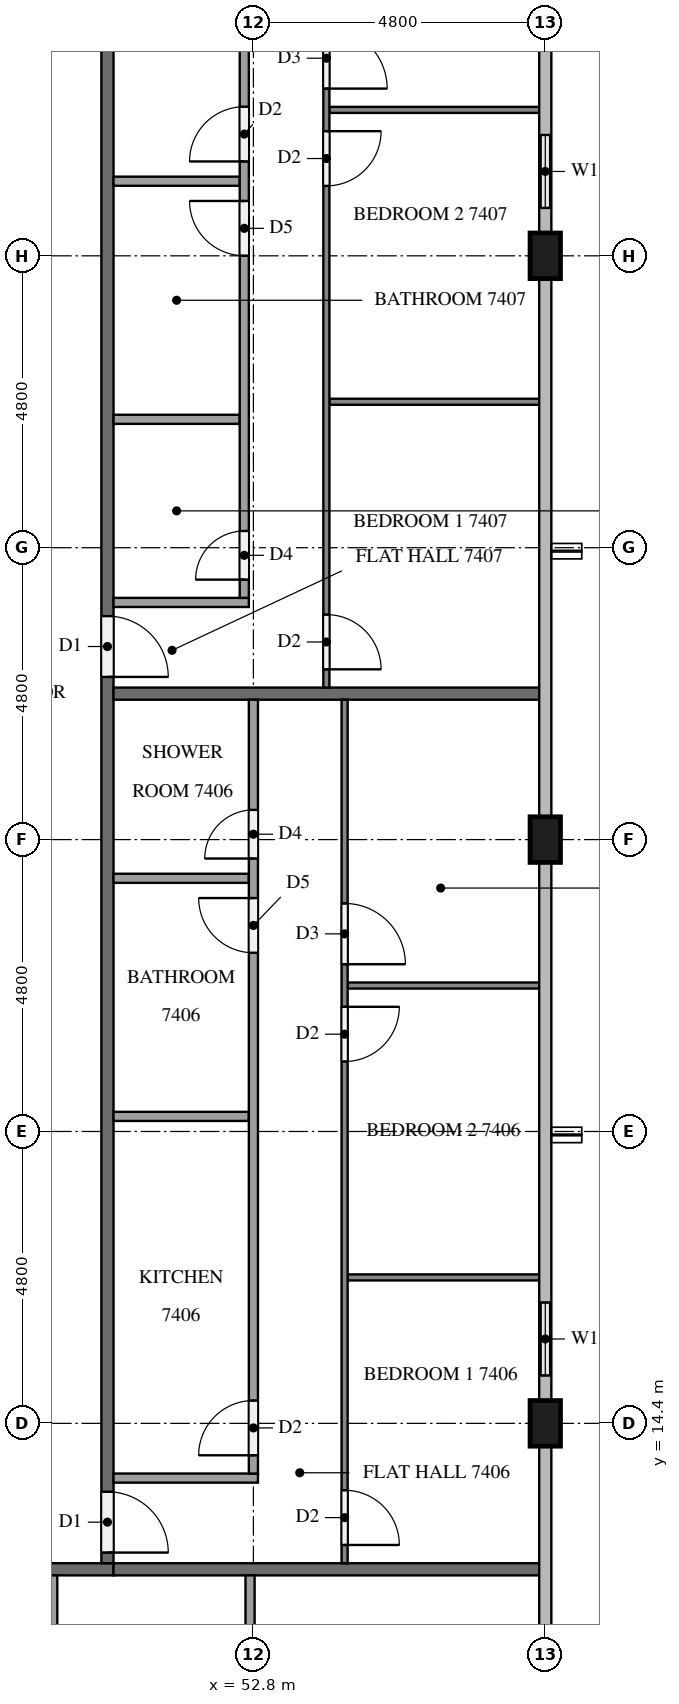
"""IFC4 building model, lengths in metres.
Left out: names, types, materials, properties, quantities, classifications, styles, units other than length and angle.
Written with IfcOpenShell. Run it as: python <this file> out.ifc"""

import sys

from ifc_helpers import new_model, si_unit, direction, frame, frame_2d, origin, origin_2d, place, context, subcontext, project, spatial, rectangle, extrude, element, fill, save


model = new_model("IFC4")
c1 = context("Model", 3, precision=1e-05, world=origin(), true_north=direction((0.0, 1.0)))
c2 = subcontext(c1, "Body", "Model", "MODEL_VIEW")
j1 = project(units=[si_unit("LENGTHUNIT", "METRE"), si_unit("PLANEANGLEUNIT", "RADIAN")], contexts=[c1])
p1 = place(None, origin())
s1 = spatial("IfcSite", under=j1, at=p1, CompositionType="ELEMENT")
p2 = place(p1, origin())
s2 = spatial("IfcBuilding", under=s1, at=p2, CompositionType="ELEMENT")
p3 = place(p2, frame((0.0, 0.0, 282.6)))
s3 = spatial("IfcBuildingStorey", under=s2, at=p3, CompositionType="ELEMENT", Elevation=282.6)
for number, where, z_axis, x_axis in (
    (1, (57.6, 14.4, 0.0), (0.0, 0.0, 1.0), (0.0, 1.0, 0.0)),
    (2, (57.6, 24.0, 0.0), (0.0, 0.0, 1.0), (0.0, 1.0, 0.0)),
    (3, (57.6, 33.6, 0.0), (0.0, 0.0, 1.0), (0.0, 1.0, 0.0)),
):
    element("IfcColumn", number, at=place(p3, frame(where, z_axis=z_axis, x_axis=x_axis)), inside=s3, PredefinedType="COLUMN", context=c2, shape_type="SweptSolid", body=[
        extrude(rectangle(XDim=0.75, YDim=0.5, at=origin_2d()), origin(), (0.0, 0.0, 1.0), 3.2),
    ])
p4 = place(p3, frame((57.6, 14.775, 0.0), z_axis=(0.0, 0.0, 1.0), x_axis=(0.0, 1.0, 0.0)))
e4 = element("IfcWall", 4, at=p4, inside=s3, PredefinedType="SOLIDWALL", context=c2, shape_type="SweptSolid", body=[
    extrude(rectangle(XDim=2.025, YDim=0.15, at=frame_2d((1.013, 0.0))), origin(), (0.0, 0.0, 1.0), 3.2),
])
p5 = place(p4, frame((0.413, 0.0, 0.9)))
e5 = element("IfcOpeningElement", 5, at=p5, cuts=e4, PredefinedType="OPENING", context=c2, shape_type="SweptSolid", body=[
    extrude(rectangle(XDim=1.2, YDim=1.4, at=frame_2d((0.6, 0.7))), frame((0.0, 0.085, 0.0), z_axis=(0.0, -1.0, 0.0), x_axis=(1.0, 0.0, 0.0)), (0.0, 0.0, 1.0), 0.17),
])
p6 = place(p3, frame((57.6, 33.975, 0.0), z_axis=(0.0, 0.0, 1.0), x_axis=(0.0, 1.0, 0.0)))
e6 = element("IfcWall", 6, at=p6, inside=s3, PredefinedType="SOLIDWALL", context=c2, shape_type="SweptSolid", body=[
    extrude(rectangle(XDim=2.025, YDim=0.15, at=frame_2d((1.012, 0.0))), origin(), (0.0, 0.0, 1.0), 3.2),
])
p7 = place(p6, frame((0.413, 0.0, 0.9)))
e7 = element("IfcOpeningElement", 7, at=p7, cuts=e6, PredefinedType="OPENING", context=c2, shape_type="SweptSolid", body=[
    extrude(rectangle(XDim=1.2, YDim=1.4, at=frame_2d((0.6, 0.7))), frame((0.0, 0.085, 0.0), z_axis=(0.0, -1.0, 0.0), x_axis=(1.0, 0.0, 0.0)), (0.0, 0.0, 1.0), 0.17),
])
p8 = place(p3, frame((50.5, 12.0, 0.0), z_axis=(0.0, 0.0, 1.0), x_axis=(-1.0, 0.0, 0.0)))
e8 = element("IfcWall", 8, at=p8, inside=s3, PredefinedType="PARTITIONING", context=c2, shape_type="SweptSolid", body=[
    extrude(rectangle(XDim=38.6, YDim=0.2, at=frame_2d((19.3, 0.0))), origin(), (0.0, 0.0, 1.0), 3.2),
])
p9 = place(p8, frame((36.375, 0.0, 0.0)))
e9 = element("IfcOpeningElement", 9, at=p9, cuts=e8, PredefinedType="OPENING", context=c2, shape_type="SweptSolid", body=[
    extrude(rectangle(XDim=1.0, YDim=2.1, at=frame_2d((0.5, 1.05))), frame((0.0, 0.11, 0.0), z_axis=(0.0, -1.0, 0.0), x_axis=(1.0, 0.0, 0.0)), (0.0, 0.0, 1.0), 0.22),
])
p10 = place(p8, frame((29.175, 0.0, 0.0)))
e10 = element("IfcOpeningElement", 10, at=p10, cuts=e8, PredefinedType="OPENING", context=c2, shape_type="SweptSolid", body=[
    extrude(rectangle(XDim=1.0, YDim=2.1, at=frame_2d((0.5, 1.05))), frame((0.0, 0.11, 0.0), z_axis=(0.0, -1.0, 0.0), x_axis=(1.0, 0.0, 0.0)), (0.0, 0.0, 1.0), 0.22),
])
p11 = place(p8, frame((27.625, 0.0, 0.0)))
e11 = element("IfcOpeningElement", 11, at=p11, cuts=e8, PredefinedType="OPENING", context=c2, shape_type="SweptSolid", body=[
    extrude(rectangle(XDim=1.0, YDim=2.1, at=frame_2d((0.5, 1.05))), frame((0.0, 0.11, 0.0), z_axis=(0.0, -1.0, 0.0), x_axis=(1.0, 0.0, 0.0)), (0.0, 0.0, 1.0), 0.22),
])
p12 = place(p8, frame((2.775, 0.0, 0.0)))
e12 = element("IfcOpeningElement", 12, at=p12, cuts=e8, PredefinedType="OPENING", context=c2, shape_type="SweptSolid", body=[
    extrude(rectangle(XDim=1.0, YDim=2.1, at=frame_2d((0.5, 1.05))), frame((0.0, 0.11, 0.0), z_axis=(0.0, -1.0, 0.0), x_axis=(1.0, 0.0, 0.0)), (0.0, 0.0, 1.0), 0.22),
])
p13 = place(p8, frame((1.225, 0.0, 0.0)))
e13 = element("IfcOpeningElement", 13, at=p13, cuts=e8, PredefinedType="OPENING", context=c2, shape_type="SweptSolid", body=[
    extrude(rectangle(XDim=1.0, YDim=2.1, at=frame_2d((0.5, 1.05))), frame((0.0, 0.11, 0.0), z_axis=(0.0, -1.0, 0.0), x_axis=(1.0, 0.0, 0.0)), (0.0, 0.0, 1.0), 0.22),
])
p14 = place(p3, frame((50.4, 40.7, 0.0), z_axis=(0.0, 0.0, 1.0), x_axis=(0.0, -1.0, 0.0)))
e14 = element("IfcWall", 14, at=p14, inside=s3, PredefinedType="PARTITIONING", context=c2, shape_type="SweptSolid", body=[
    extrude(rectangle(XDim=28.6, YDim=0.2, at=frame_2d((14.3, 0.0))), origin(), (0.0, 0.0, 1.0), 3.2),
])
p15 = place(p14, frame((27.425, 0.0, 0.0)))
e15 = element("IfcOpeningElement", 15, at=p15, cuts=e14, PredefinedType="OPENING", context=c2, shape_type="SweptSolid", body=[
    extrude(rectangle(XDim=1.0, YDim=2.1, at=frame_2d((0.5, 1.05))), frame((0.0, 0.11, 0.0), z_axis=(0.0, -1.0, 0.0), x_axis=(1.0, 0.0, 0.0)), (0.0, 0.0, 1.0), 0.22),
])
p16 = place(p14, frame((13.025, 0.0, 0.0)))
e16 = element("IfcOpeningElement", 16, at=p16, cuts=e14, PredefinedType="OPENING", context=c2, shape_type="SweptSolid", body=[
    extrude(rectangle(XDim=1.0, YDim=2.1, at=frame_2d((0.5, 1.05))), frame((0.0, 0.11, 0.0), z_axis=(0.0, -1.0, 0.0), x_axis=(1.0, 0.0, 0.0)), (0.0, 0.0, 1.0), 0.22),
])
for number, where, z_axis, x_axis in (
    (17, (50.5, 12.0, 0.0), (0.0, 0.0, 1.0), (1.0, 0.0, 0.0)),
    (18, (50.5, 26.4, 0.0), (0.0, 0.0, 1.0), (1.0, 0.0, 0.0)),
):
    element("IfcWall", number, at=place(p3, frame(where, z_axis=z_axis, x_axis=x_axis)), inside=s3, PredefinedType="PARTITIONING", context=c2, shape_type="SweptSolid", body=[
        extrude(rectangle(XDim=7.0, YDim=0.2, at=frame_2d((3.5, 0.0))), origin(), (0.0, 0.0, 1.0), 3.2),
    ])
p17 = place(p3, frame((52.745, 11.9, 0.0), z_axis=(0.0, 0.0, 1.0), x_axis=(0.0, -1.0, 0.0)))
e19 = element("IfcWall", 19, at=p17, inside=s3, PredefinedType="PARTITIONING", context=c2, shape_type="SweptSolid", body=[
    extrude(rectangle(XDim=3.575, YDim=0.15, at=frame_2d((1.788, 0.0))), origin(), (0.0, 0.0, 1.0), 3.2),
])
p18 = place(p3, frame((49.5, 11.9, 0.0), z_axis=(0.0, 0.0, 1.0), x_axis=(0.0, -1.0, 0.0)))
e20 = element("IfcWall", 20, at=p18, inside=s3, PredefinedType="PARTITIONING", context=c2, shape_type="SweptSolid", body=[
    extrude(rectangle(XDim=3.725, YDim=0.15, at=frame_2d((1.862, 0.0))), origin(), (0.0, 0.0, 1.0), 3.2),
])
for number, where, z_axis, x_axis in (
    (21, (54.35, 16.8, 0.0), (0.0, 0.0, 1.0), (1.0, 0.0, 0.0)),
    (22, (54.35, 21.6, 0.0), (0.0, 0.0, 1.0), (1.0, 0.0, 0.0)),
):
    element("IfcWall", number, at=place(p3, frame(where, z_axis=z_axis, x_axis=x_axis)), inside=s3, PredefinedType="PARTITIONING", context=c2, shape_type="SweptSolid", body=[
        extrude(rectangle(XDim=3.15, YDim=0.1, at=frame_2d((1.575, 0.0))), origin(), (0.0, 0.0, 1.0), 3.2),
    ])
p19 = place(p3, frame((54.3, 26.3, 0.0), z_axis=(0.0, 0.0, 1.0), x_axis=(0.0, -1.0, 0.0)))
e23 = element("IfcWall", 23, at=p19, inside=s3, PredefinedType="PARTITIONING", context=c2, shape_type="SweptSolid", body=[
    extrude(rectangle(XDim=14.2, YDim=0.1, at=frame_2d((7.1, 0.0))), origin(), (0.0, 0.0, 1.0), 3.2),
])
p20 = place(p19, frame((13.0, 0.0, 0.0)))
e24 = element("IfcOpeningElement", 24, at=p20, cuts=e23, PredefinedType="OPENING", context=c2, shape_type="SweptSolid", body=[
    extrude(rectangle(XDim=0.9, YDim=2.1, at=frame_2d((0.45, 1.05))), frame((0.0, 0.06, 0.0), z_axis=(0.0, -1.0, 0.0), x_axis=(1.0, 0.0, 0.0)), (0.0, 0.0, 1.0), 0.12),
])
p21 = place(p19, frame((5.05, 0.0, 0.0)))
e25 = element("IfcOpeningElement", 25, at=p21, cuts=e23, PredefinedType="OPENING", context=c2, shape_type="SweptSolid", body=[
    extrude(rectangle(XDim=0.9, YDim=2.1, at=frame_2d((0.45, 1.05))), frame((0.0, 0.06, 0.0), z_axis=(0.0, -1.0, 0.0), x_axis=(1.0, 0.0, 0.0)), (0.0, 0.0, 1.0), 0.12),
])
p22 = place(p19, frame((3.35, 0.0, 0.0)))
e26 = element("IfcOpeningElement", 26, at=p22, cuts=e23, PredefinedType="OPENING", context=c2, shape_type="SweptSolid", body=[
    extrude(rectangle(XDim=1.0, YDim=2.1, at=frame_2d((0.5, 1.05))), frame((0.0, 0.06, 0.0), z_axis=(0.0, -1.0, 0.0), x_axis=(1.0, 0.0, 0.0)), (0.0, 0.0, 1.0), 0.12),
])
for number, where, z_axis, x_axis in (
    (27, (50.5, 19.448, 0.0), (0.0, 0.0, 1.0), (1.0, 0.0, 0.0)),
    (28, (50.5, 23.364, 0.0), (0.0, 0.0, 1.0), (1.0, 0.0, 0.0)),
):
    element("IfcWall", number, at=place(p3, frame(where, z_axis=z_axis, x_axis=x_axis)), inside=s3, PredefinedType="PARTITIONING", context=c2, shape_type="SweptSolid", body=[
        extrude(rectangle(XDim=2.225, YDim=0.15, at=frame_2d((1.113, 0.0))), origin(), (0.0, 0.0, 1.0), 3.2),
    ])
p23 = place(p3, frame((50.5, 13.5, 0.0), z_axis=(0.0, 0.0, 1.0), x_axis=(1.0, 0.0, 0.0)))
e29 = element("IfcWall", 29, at=p23, inside=s3, PredefinedType="PARTITIONING", context=c2, shape_type="SweptSolid", body=[
    extrude(rectangle(XDim=2.375, YDim=0.15, at=frame_2d((1.188, 0.0))), origin(), (0.0, 0.0, 1.0), 3.2),
])
p24 = place(p3, frame((52.8, 13.575, 0.0), z_axis=(0.0, 0.0, 1.0), x_axis=(0.0, 1.0, 0.0)))
e30 = element("IfcWall", 30, at=p24, inside=s3, PredefinedType="PARTITIONING", context=c2, shape_type="SweptSolid", body=[
    extrude(rectangle(XDim=12.725, YDim=0.15, at=frame_2d((6.363, 0.0))), origin(), (0.0, 0.0, 1.0), 3.2),
])
p25 = place(p24, frame((0.3, 0.0, 0.0)))
e31 = element("IfcOpeningElement", 31, at=p25, cuts=e30, PredefinedType="OPENING", context=c2, shape_type="SweptSolid", body=[
    extrude(rectangle(XDim=0.9, YDim=2.1, at=frame_2d((0.45, 1.05))), frame((0.0, 0.085, 0.0), z_axis=(0.0, -1.0, 0.0), x_axis=(1.0, 0.0, 0.0)), (0.0, 0.0, 1.0), 0.17),
])
p26 = place(p24, frame((8.563, 0.0, 0.0)))
e32 = element("IfcOpeningElement", 32, at=p26, cuts=e30, PredefinedType="OPENING", context=c2, shape_type="SweptSolid", body=[
    extrude(rectangle(XDim=0.9, YDim=2.1, at=frame_2d((0.45, 1.05))), frame((0.0, 0.085, 0.0), z_axis=(0.0, -1.0, 0.0), x_axis=(1.0, 0.0, 0.0)), (0.0, 0.0, 1.0), 0.17),
])
p27 = place(p24, frame((10.114, 0.0, 0.0)))
e33 = element("IfcOpeningElement", 33, at=p27, cuts=e30, PredefinedType="OPENING", context=c2, shape_type="SweptSolid", body=[
    extrude(rectangle(XDim=0.8, YDim=2.1, at=frame_2d((0.4, 1.05))), frame((0.0, 0.085, 0.0), z_axis=(0.0, -1.0, 0.0), x_axis=(1.0, 0.0, 0.0)), (0.0, 0.0, 1.0), 0.17),
])
for number, where, z_axis, x_axis in (
    (34, (54.05, 31.2, 0.0), (0.0, 0.0, 1.0), (1.0, 0.0, 0.0)),
    (35, (54.05, 36.0, 0.0), (0.0, 0.0, 1.0), (1.0, 0.0, 0.0)),
):
    element("IfcWall", number, at=place(p3, frame(where, z_axis=z_axis, x_axis=x_axis)), inside=s3, PredefinedType="PARTITIONING", context=c2, shape_type="SweptSolid", body=[
        extrude(rectangle(XDim=3.45, YDim=0.1, at=frame_2d((1.725, 0.0))), origin(), (0.0, 0.0, 1.0), 3.2),
    ])
p28 = place(p3, frame((54.0, 40.7, 0.0), z_axis=(0.0, 0.0, 1.0), x_axis=(0.0, -1.0, 0.0)))
e36 = element("IfcWall", 36, at=p28, inside=s3, PredefinedType="PARTITIONING", context=c2, shape_type="SweptSolid", body=[
    extrude(rectangle(XDim=14.2, YDim=0.1, at=frame_2d((7.1, 0.0))), origin(), (0.0, 0.0, 1.0), 3.2),
])
p29 = place(p28, frame((13.0, 0.0, 0.0)))
e37 = element("IfcOpeningElement", 37, at=p29, cuts=e36, PredefinedType="OPENING", context=c2, shape_type="SweptSolid", body=[
    extrude(rectangle(XDim=0.9, YDim=2.1, at=frame_2d((0.45, 1.05))), frame((0.0, 0.06, 0.0), z_axis=(0.0, -1.0, 0.0), x_axis=(1.0, 0.0, 0.0)), (0.0, 0.0, 1.0), 0.12),
])
p30 = place(p28, frame((5.05, 0.0, 0.0)))
e38 = element("IfcOpeningElement", 38, at=p30, cuts=e36, PredefinedType="OPENING", context=c2, shape_type="SweptSolid", body=[
    extrude(rectangle(XDim=0.9, YDim=2.1, at=frame_2d((0.45, 1.05))), frame((0.0, 0.06, 0.0), z_axis=(0.0, -1.0, 0.0), x_axis=(1.0, 0.0, 0.0)), (0.0, 0.0, 1.0), 0.12),
])
p31 = place(p28, frame((3.35, 0.0, 0.0)))
e39 = element("IfcOpeningElement", 39, at=p31, cuts=e36, PredefinedType="OPENING", context=c2, shape_type="SweptSolid", body=[
    extrude(rectangle(XDim=1.0, YDim=2.1, at=frame_2d((0.5, 1.05))), frame((0.0, 0.06, 0.0), z_axis=(0.0, -1.0, 0.0), x_axis=(1.0, 0.0, 0.0)), (0.0, 0.0, 1.0), 0.12),
])
for number, where, z_axis, x_axis in (
    (40, (50.5, 30.912, 0.0), (0.0, 0.0, 1.0), (1.0, 0.0, 0.0)),
    (41, (50.5, 34.827, 0.0), (0.0, 0.0, 1.0), (1.0, 0.0, 0.0)),
):
    element("IfcWall", number, at=place(p3, frame(where, z_axis=z_axis, x_axis=x_axis)), inside=s3, PredefinedType="PARTITIONING", context=c2, shape_type="SweptSolid", body=[
        extrude(rectangle(XDim=2.075, YDim=0.15, at=frame_2d((1.038, 0.0))), origin(), (0.0, 0.0, 1.0), 3.2),
    ])
p32 = place(p3, frame((50.5, 27.9, 0.0), z_axis=(0.0, 0.0, 1.0), x_axis=(1.0, 0.0, 0.0)))
e42 = element("IfcWall", 42, at=p32, inside=s3, PredefinedType="PARTITIONING", context=c2, shape_type="SweptSolid", body=[
    extrude(rectangle(XDim=2.225, YDim=0.15, at=frame_2d((1.113, 0.0))), origin(), (0.0, 0.0, 1.0), 3.2),
])
p33 = place(p3, frame((52.65, 27.975, 0.0), z_axis=(0.0, 0.0, 1.0), x_axis=(0.0, 1.0, 0.0)))
e43 = element("IfcWall", 43, at=p33, inside=s3, PredefinedType="PARTITIONING", context=c2, shape_type="SweptSolid", body=[
    extrude(rectangle(XDim=12.725, YDim=0.15, at=frame_2d((6.362, 0.0))), origin(), (0.0, 0.0, 1.0), 3.2),
])
p34 = place(p33, frame((0.3, 0.0, 0.0)))
e44 = element("IfcOpeningElement", 44, at=p34, cuts=e43, PredefinedType="OPENING", context=c2, shape_type="SweptSolid", body=[
    extrude(rectangle(XDim=0.8, YDim=2.1, at=frame_2d((0.4, 1.05))), frame((0.0, 0.085, 0.0), z_axis=(0.0, -1.0, 0.0), x_axis=(1.0, 0.0, 0.0)), (0.0, 0.0, 1.0), 0.17),
])
p35 = place(p33, frame((5.627, 0.0, 0.0)))
e45 = element("IfcOpeningElement", 45, at=p35, cuts=e43, PredefinedType="OPENING", context=c2, shape_type="SweptSolid", body=[
    extrude(rectangle(XDim=0.9, YDim=2.1, at=frame_2d((0.45, 1.05))), frame((0.0, 0.085, 0.0), z_axis=(0.0, -1.0, 0.0), x_axis=(1.0, 0.0, 0.0)), (0.0, 0.0, 1.0), 0.17),
])
p36 = place(p33, frame((7.177, 0.0, 0.0)))
e46 = element("IfcOpeningElement", 46, at=p36, cuts=e43, PredefinedType="OPENING", context=c2, shape_type="SweptSolid", body=[
    extrude(rectangle(XDim=0.9, YDim=2.1, at=frame_2d((0.45, 1.05))), frame((0.0, 0.085, 0.0), z_axis=(0.0, -1.0, 0.0), x_axis=(1.0, 0.0, 0.0)), (0.0, 0.0, 1.0), 0.17),
])
p37 = place(p5, origin())
e47 = element("IfcWindow", 47, at=p37, inside=s3, PartitioningType="SINGLE_PANEL", PredefinedType="WINDOW", context=c2, shape_type="SweptSolid", body=[
    extrude(rectangle(XDim=1.2, YDim=1.4, at=frame_2d((0.6, 0.7))), frame((0.0, 0.03, 0.0), z_axis=(0.0, -1.0, 0.0), x_axis=(1.0, 0.0, 0.0)), (0.0, 0.0, 1.0), 0.06),
])
fill(e5, e47)
p38 = place(p7, origin())
e48 = element("IfcWindow", 48, at=p38, inside=s3, PartitioningType="SINGLE_PANEL", PredefinedType="WINDOW", context=c2, shape_type="SweptSolid", body=[
    extrude(rectangle(XDim=1.2, YDim=1.4, at=frame_2d((0.6, 0.7))), frame((0.0, 0.03, 0.0), z_axis=(0.0, -1.0, 0.0), x_axis=(1.0, 0.0, 0.0)), (0.0, 0.0, 1.0), 0.06),
])
fill(e7, e48)
p39 = place(p15, origin())
e49 = element("IfcDoor", 49, at=p39, inside=s3, OperationType="SINGLE_SWING_RIGHT", PredefinedType="DOOR", context=c2, shape_type="SweptSolid", body=[
    extrude(rectangle(XDim=1.0, YDim=2.1, at=frame_2d((0.5, 1.05))), frame((0.0, 0.025, 0.0), z_axis=(0.0, -1.0, 0.0), x_axis=(1.0, 0.0, 0.0)), (0.0, 0.0, 1.0), 0.05),
])
fill(e15, e49)
p40 = place(p16, origin())
e50 = element("IfcDoor", 50, at=p40, inside=s3, OperationType="SINGLE_SWING_RIGHT", PredefinedType="DOOR", context=c2, shape_type="SweptSolid", body=[
    extrude(rectangle(XDim=1.0, YDim=2.1, at=frame_2d((0.5, 1.05))), frame((0.0, 0.025, 0.0), z_axis=(0.0, -1.0, 0.0), x_axis=(1.0, 0.0, 0.0)), (0.0, 0.0, 1.0), 0.05),
])
fill(e16, e50)
p41 = place(p20, origin())
e51 = element("IfcDoor", 51, at=p41, inside=s3, OperationType="SINGLE_SWING_RIGHT", PredefinedType="DOOR", context=c2, shape_type="SweptSolid", body=[
    extrude(rectangle(XDim=0.9, YDim=2.1, at=frame_2d((0.45, 1.05))), frame((0.0, 0.025, 0.0), z_axis=(0.0, -1.0, 0.0), x_axis=(1.0, 0.0, 0.0)), (0.0, 0.0, 1.0), 0.05),
])
fill(e24, e51)
p42 = place(p21, origin())
e52 = element("IfcDoor", 52, at=p42, inside=s3, OperationType="SINGLE_SWING_LEFT", PredefinedType="DOOR", context=c2, shape_type="SweptSolid", body=[
    extrude(rectangle(XDim=0.9, YDim=2.1, at=frame_2d((0.45, 1.05))), frame((0.0, 0.025, 0.0), z_axis=(0.0, -1.0, 0.0), x_axis=(1.0, 0.0, 0.0)), (0.0, 0.0, 1.0), 0.05),
])
fill(e25, e52)
p43 = place(p22, origin())
e53 = element("IfcDoor", 53, at=p43, inside=s3, OperationType="SINGLE_SWING_RIGHT", PredefinedType="DOOR", context=c2, shape_type="SweptSolid", body=[
    extrude(rectangle(XDim=1.0, YDim=2.1, at=frame_2d((0.5, 1.05))), frame((0.0, 0.025, 0.0), z_axis=(0.0, -1.0, 0.0), x_axis=(1.0, 0.0, 0.0)), (0.0, 0.0, 1.0), 0.05),
])
fill(e26, e53)
p44 = place(p25, origin())
e54 = element("IfcDoor", 54, at=p44, inside=s3, OperationType="SINGLE_SWING_LEFT", PredefinedType="DOOR", context=c2, shape_type="SweptSolid", body=[
    extrude(rectangle(XDim=0.9, YDim=2.1, at=frame_2d((0.45, 1.05))), frame((0.0, 0.025, 0.0), z_axis=(0.0, -1.0, 0.0), x_axis=(1.0, 0.0, 0.0)), (0.0, 0.0, 1.0), 0.05),
])
fill(e31, e54)
p45 = place(p26, origin())
e55 = element("IfcDoor", 55, at=p45, inside=s3, OperationType="SINGLE_SWING_RIGHT", PredefinedType="DOOR", context=c2, shape_type="SweptSolid", body=[
    extrude(rectangle(XDim=0.9, YDim=2.1, at=frame_2d((0.45, 1.05))), frame((0.0, 0.025, 0.0), z_axis=(0.0, -1.0, 0.0), x_axis=(1.0, 0.0, 0.0)), (0.0, 0.0, 1.0), 0.05),
])
fill(e32, e55)
p46 = place(p27, origin())
e56 = element("IfcDoor", 56, at=p46, inside=s3, OperationType="SINGLE_SWING_LEFT", PredefinedType="DOOR", context=c2, shape_type="SweptSolid", body=[
    extrude(rectangle(XDim=0.8, YDim=2.1, at=frame_2d((0.4, 1.05))), frame((0.0, 0.025, 0.0), z_axis=(0.0, -1.0, 0.0), x_axis=(1.0, 0.0, 0.0)), (0.0, 0.0, 1.0), 0.05),
])
fill(e33, e56)
p47 = place(p29, origin())
e57 = element("IfcDoor", 57, at=p47, inside=s3, OperationType="SINGLE_SWING_RIGHT", PredefinedType="DOOR", context=c2, shape_type="SweptSolid", body=[
    extrude(rectangle(XDim=0.9, YDim=2.1, at=frame_2d((0.45, 1.05))), frame((0.0, 0.025, 0.0), z_axis=(0.0, -1.0, 0.0), x_axis=(1.0, 0.0, 0.0)), (0.0, 0.0, 1.0), 0.05),
])
fill(e37, e57)
p48 = place(p30, origin())
e58 = element("IfcDoor", 58, at=p48, inside=s3, OperationType="SINGLE_SWING_LEFT", PredefinedType="DOOR", context=c2, shape_type="SweptSolid", body=[
    extrude(rectangle(XDim=0.9, YDim=2.1, at=frame_2d((0.45, 1.05))), frame((0.0, 0.025, 0.0), z_axis=(0.0, -1.0, 0.0), x_axis=(1.0, 0.0, 0.0)), (0.0, 0.0, 1.0), 0.05),
])
fill(e38, e58)
p49 = place(p31, origin())
e59 = element("IfcDoor", 59, at=p49, inside=s3, OperationType="SINGLE_SWING_RIGHT", PredefinedType="DOOR", context=c2, shape_type="SweptSolid", body=[
    extrude(rectangle(XDim=1.0, YDim=2.1, at=frame_2d((0.5, 1.05))), frame((0.0, 0.025, 0.0), z_axis=(0.0, -1.0, 0.0), x_axis=(1.0, 0.0, 0.0)), (0.0, 0.0, 1.0), 0.05),
])
fill(e39, e59)
p50 = place(p34, origin())
e60 = element("IfcDoor", 60, at=p50, inside=s3, OperationType="SINGLE_SWING_LEFT", PredefinedType="DOOR", context=c2, shape_type="SweptSolid", body=[
    extrude(rectangle(XDim=0.8, YDim=2.1, at=frame_2d((0.4, 1.05))), frame((0.0, 0.025, 0.0), z_axis=(0.0, -1.0, 0.0), x_axis=(1.0, 0.0, 0.0)), (0.0, 0.0, 1.0), 0.05),
])
fill(e44, e60)
p51 = place(p35, origin())
e61 = element("IfcDoor", 61, at=p51, inside=s3, OperationType="SINGLE_SWING_RIGHT", PredefinedType="DOOR", context=c2, shape_type="SweptSolid", body=[
    extrude(rectangle(XDim=0.9, YDim=2.1, at=frame_2d((0.45, 1.05))), frame((0.0, 0.025, 0.0), z_axis=(0.0, -1.0, 0.0), x_axis=(1.0, 0.0, 0.0)), (0.0, 0.0, 1.0), 0.05),
])
fill(e45, e61)
p52 = place(p36, origin())
e62 = element("IfcDoor", 62, at=p52, inside=s3, OperationType="SINGLE_SWING_LEFT", PredefinedType="DOOR", context=c2, shape_type="SweptSolid", body=[
    extrude(rectangle(XDim=0.9, YDim=2.1, at=frame_2d((0.45, 1.05))), frame((0.0, 0.025, 0.0), z_axis=(0.0, -1.0, 0.0), x_axis=(1.0, 0.0, 0.0)), (0.0, 0.0, 1.0), 0.05),
])
fill(e46, e62)
save(model, sys.argv[1])
